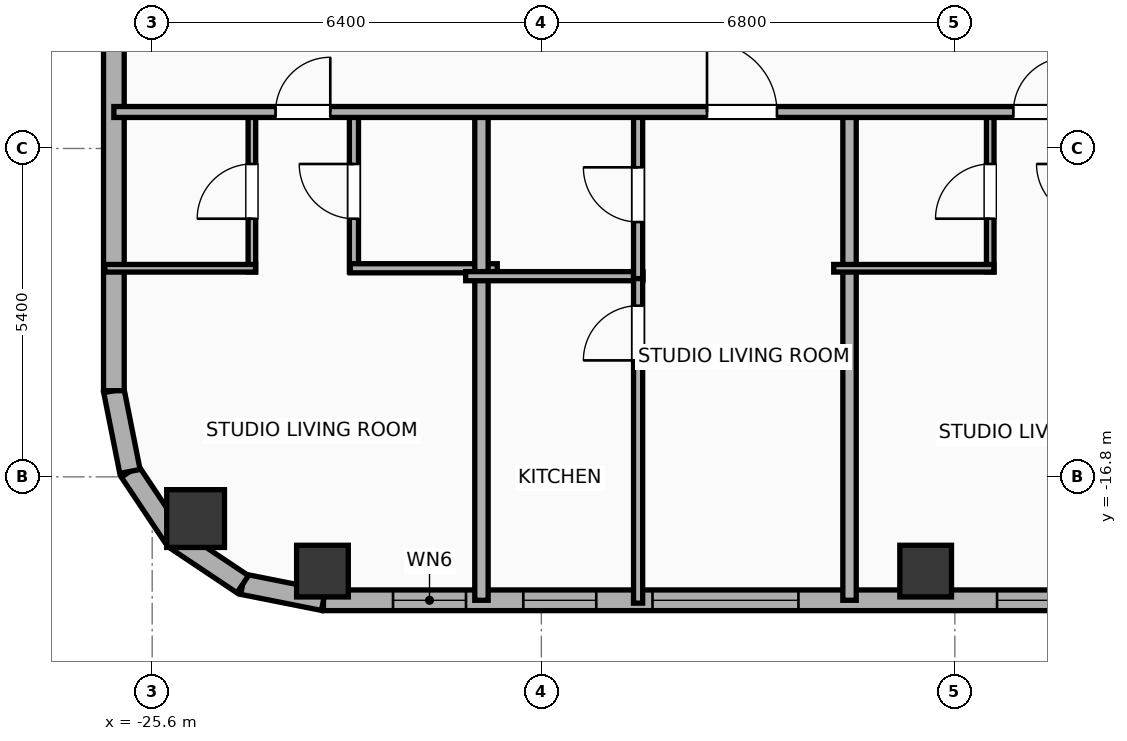
"""IFC4 building model, lengths in metres.
Left out: names, types, materials, properties, quantities, classifications, styles, units other than length and angle.
Written with IfcOpenShell. Run it as: python <this file> out.ifc"""

import sys

from ifc_helpers import new_model, si_unit, direction, frame, frame_2d, origin, origin_2d, place, context, subcontext, project, spatial, rectangle, hollow_rectangle, hollow_circle, extrude, element, fill, save


model = new_model("IFC4")
c1 = context("Model", 3, precision=1e-05, world=origin(), true_north=direction((0.0, 1.0)))
c2 = subcontext(c1, "Body", "Model", "MODEL_VIEW")
j1 = project(units=[si_unit("LENGTHUNIT", "METRE"), si_unit("PLANEANGLEUNIT", "RADIAN")], contexts=[c1])
p1 = place(None, origin())
s1 = spatial("IfcSite", under=j1, at=p1, CompositionType="ELEMENT")
p2 = place(p1, origin())
s2 = spatial("IfcBuilding", under=s1, at=p2, CompositionType="ELEMENT")
p3 = place(p2, frame((0.0, 0.0, 223.6)))
s3 = spatial("IfcBuildingStorey", under=s2, at=p3, CompositionType="ELEMENT", Elevation=223.6)
for number, where, z_axis, x_axis in (
    (1, (-22.8, -18.35, 0.0), (0.0, 0.0, 1.0), (1.0, 0.0, 0.0)),
    (2, (-12.88, -18.35, 0.0), (0.0, 0.0, 1.0), (1.0, 0.0, 0.0)),
):
    element("IfcColumn", number, at=place(p3, frame(where, z_axis=z_axis, x_axis=x_axis)), inside=s3, PredefinedType="COLUMN", context=c2, shape_type="SweptSolid", body=[
        extrude(hollow_rectangle(XDim=0.85, YDim=0.85, WallThickness=0.028, at=origin_2d()), origin(), (0.0, 0.0, 1.0), 3.9),
    ])
p4 = place(p3, frame((-24.886, -17.486, 0.0), z_axis=(0.0, 0.0, 1.0), x_axis=(1.0, 0.0, 0.0)))
e3 = element("IfcColumn", 3, at=p4, inside=s3, PredefinedType="COLUMN", context=c2, shape_type="SweptSolid", body=[
    extrude(hollow_circle(Radius=0.475, WallThickness=0.032, at=origin_2d()), origin(), (0.0, 0.0, 1.0), 3.9),
])
p5 = place(p3, frame((26.783, -18.83, 0.0), z_axis=(0.0, 0.0, 1.0), x_axis=(-1.0, 0.0, 0.0)))
e4 = element("IfcWall", 4, at=p5, inside=s3, PredefinedType="ELEMENTEDWALL", context=c2, shape_type="SweptSolid", body=[
    extrude(rectangle(XDim=49.566, YDim=0.34, at=frame_2d((24.783, 0.0))), origin(), (0.0, 0.0, 1.0), 3.65),
])
p6 = place(p5, frame((23.583, 0.0, 0.75)))
e5 = element("IfcOpeningElement", 5, at=p6, cuts=e4, PredefinedType="OPENING", context=c2, shape_type="SweptSolid", body=[
    extrude(rectangle(XDim=2.4, YDim=2.1, at=frame_2d((1.2, 1.05))), frame((0.0, 0.18, 0.0), z_axis=(0.0, -1.0, 0.0), x_axis=(1.0, 0.0, 0.0)), (0.0, 0.0, 1.0), 0.36),
])
p7 = place(p5, frame((41.756, 0.0, 0.75)))
e6 = element("IfcOpeningElement", 6, at=p7, cuts=e4, PredefinedType="OPENING", context=c2, shape_type="SweptSolid", body=[
    extrude(rectangle(XDim=2.4, YDim=2.1, at=frame_2d((1.2, 1.05))), frame((0.0, 0.18, 0.0), z_axis=(0.0, -1.0, 0.0), x_axis=(1.0, 0.0, 0.0)), (0.0, 0.0, 1.0), 0.36),
])
p8 = place(p5, frame((47.222, 0.0, 0.75)))
e7 = element("IfcOpeningElement", 7, at=p8, cuts=e4, PredefinedType="OPENING", context=c2, shape_type="SweptSolid", body=[
    extrude(rectangle(XDim=1.2, YDim=2.05, at=frame_2d((0.6, 1.025))), frame((0.0, 0.18, 0.0), z_axis=(0.0, -1.0, 0.0), x_axis=(1.0, 0.0, 0.0)), (0.0, 0.0, 1.0), 0.36),
])
p9 = place(p5, frame((45.08, 0.0, 0.75)))
e8 = element("IfcOpeningElement", 8, at=p9, cuts=e4, PredefinedType="OPENING", context=c2, shape_type="SweptSolid", body=[
    extrude(rectangle(XDim=1.2, YDim=2.05, at=frame_2d((0.6, 1.025))), frame((0.0, 0.18, 0.0), z_axis=(0.0, -1.0, 0.0), x_axis=(1.0, 0.0, 0.0)), (0.0, 0.0, 1.0), 0.36),
])
p10 = place(p5, frame((37.289, 0.0, 0.75)))
e9 = element("IfcOpeningElement", 9, at=p10, cuts=e4, PredefinedType="OPENING", context=c2, shape_type="SweptSolid", body=[
    extrude(rectangle(XDim=1.2, YDim=2.05, at=frame_2d((0.6, 1.025))), frame((0.0, 0.18, 0.0), z_axis=(0.0, -1.0, 0.0), x_axis=(1.0, 0.0, 0.0)), (0.0, 0.0, 1.0), 0.36),
])
p11 = place(p5, frame((16.115, 0.0, 0.75)))
e10 = element("IfcOpeningElement", 10, at=p11, cuts=e4, PredefinedType="OPENING", context=c2, shape_type="SweptSolid", body=[
    extrude(rectangle(XDim=1.2, YDim=2.05, at=frame_2d((0.6, 1.025))), frame((0.0, 0.18, 0.0), z_axis=(0.0, -1.0, 0.0), x_axis=(1.0, 0.0, 0.0)), (0.0, 0.0, 1.0), 0.36),
])
p12 = place(p5, frame((12.422, 0.0, 0.75)))
e11 = element("IfcOpeningElement", 11, at=p12, cuts=e4, PredefinedType="OPENING", context=c2, shape_type="SweptSolid", body=[
    extrude(rectangle(XDim=1.2, YDim=2.05, at=frame_2d((0.6, 1.025))), frame((0.0, 0.18, 0.0), z_axis=(0.0, -1.0, 0.0), x_axis=(1.0, 0.0, 0.0)), (0.0, 0.0, 1.0), 0.36),
])
p13 = place(p5, frame((8.09, 0.0, 0.75)))
e12 = element("IfcOpeningElement", 12, at=p13, cuts=e4, PredefinedType="OPENING", context=c2, shape_type="SweptSolid", body=[
    extrude(rectangle(XDim=1.2, YDim=2.05, at=frame_2d((0.6, 1.025))), frame((0.0, 0.18, 0.0), z_axis=(0.0, -1.0, 0.0), x_axis=(1.0, 0.0, 0.0)), (0.0, 0.0, 1.0), 0.36),
])
p14 = place(p5, frame((4.637, 0.0, 0.75)))
e13 = element("IfcOpeningElement", 13, at=p14, cuts=e4, PredefinedType="OPENING", context=c2, shape_type="SweptSolid", body=[
    extrude(rectangle(XDim=1.2, YDim=2.05, at=frame_2d((0.6, 1.025))), frame((0.0, 0.18, 0.0), z_axis=(0.0, -1.0, 0.0), x_axis=(1.0, 0.0, 0.0)), (0.0, 0.0, 1.0), 0.36),
])
p15 = place(p5, frame((1.811, 0.0, 0.75)))
e14 = element("IfcOpeningElement", 14, at=p15, cuts=e4, PredefinedType="OPENING", context=c2, shape_type="SweptSolid", body=[
    extrude(rectangle(XDim=1.2, YDim=2.05, at=frame_2d((0.6, 1.025))), frame((0.0, 0.18, 0.0), z_axis=(0.0, -1.0, 0.0), x_axis=(1.0, 0.0, 0.0)), (0.0, 0.0, 1.0), 0.36),
])
p16 = place(p5, frame((32.253, 0.0, 0.75)))
e15 = element("IfcOpeningElement", 15, at=p16, cuts=e4, PredefinedType="OPENING", context=c2, shape_type="SweptSolid", body=[
    extrude(rectangle(XDim=1.2, YDim=2.05, at=frame_2d((0.6, 1.025))), frame((0.0, 0.18, 0.0), z_axis=(0.0, -1.0, 0.0), x_axis=(1.0, 0.0, 0.0)), (0.0, 0.0, 1.0), 0.36),
])
p17 = place(p5, frame((27.853, 0.0, 0.75)))
e16 = element("IfcOpeningElement", 16, at=p17, cuts=e4, PredefinedType="OPENING", context=c2, shape_type="SweptSolid", body=[
    extrude(rectangle(XDim=1.2, YDim=2.05, at=frame_2d((0.6, 1.025))), frame((0.0, 0.18, 0.0), z_axis=(0.0, -1.0, 0.0), x_axis=(1.0, 0.0, 0.0)), (0.0, 0.0, 1.0), 0.36),
])
p18 = place(p5, frame((20.473, 0.0, 0.75)))
e17 = element("IfcOpeningElement", 17, at=p18, cuts=e4, PredefinedType="OPENING", context=c2, shape_type="SweptSolid", body=[
    extrude(rectangle(XDim=1.2, YDim=2.05, at=frame_2d((0.6, 1.025))), frame((0.0, 0.18, 0.0), z_axis=(0.0, -1.0, 0.0), x_axis=(1.0, 0.0, 0.0)), (0.0, 0.0, 1.0), 0.36),
])
p19 = place(p3, frame((-22.783, -18.83, 0.0), z_axis=(0.0, 0.0, 1.0), x_axis=(-0.980788153188, 0.195075878998, 0.0)))
e18 = element("IfcWall", 18, at=p19, inside=s3, PredefinedType="ELEMENTEDWALL", context=c2, shape_type="SweptSolid", body=[
    extrude(rectangle(XDim=1.354, YDim=0.34, at=frame_2d((0.677, 0.0))), origin(), (0.0, 0.0, 1.0), 3.65),
])
p20 = place(p3, frame((-24.111, -18.566, 0.0), z_axis=(0.0, 0.0, 1.0), x_axis=(-0.831403586725, 0.555669034571, 0.0)))
e19 = element("IfcWall", 19, at=p20, inside=s3, PredefinedType="ELEMENTEDWALL", context=c2, shape_type="SweptSolid", body=[
    extrude(rectangle(XDim=1.337, YDim=0.34, at=frame_2d((0.668, 0.0))), origin(), (0.0, 0.0, 1.0), 3.65),
])
p21 = place(p3, frame((-25.223, -17.823, 0.0), z_axis=(0.0, 0.0, 1.0), x_axis=(-0.555584683399, 0.831459956686, 0.0)))
e20 = element("IfcWall", 20, at=p21, inside=s3, PredefinedType="ELEMENTEDWALL", context=c2, shape_type="SweptSolid", body=[
    extrude(rectangle(XDim=1.337, YDim=0.34, at=frame_2d((0.668, 0.0))), origin(), (0.0, 0.0, 1.0), 3.65),
])
p22 = place(p3, frame((-25.966, -16.711, 0.0), z_axis=(0.0, 0.0, 1.0), x_axis=(-0.195110379894, 0.98078129043, 0.0)))
e21 = element("IfcWall", 21, at=p22, inside=s3, PredefinedType="ELEMENTEDWALL", context=c2, shape_type="SweptSolid", body=[
    extrude(rectangle(XDim=1.354, YDim=0.34, at=frame_2d((0.677, 0.0))), origin(), (0.0, 0.0, 1.0), 3.65),
])
p23 = place(p3, frame((-26.23, -15.383, 0.0), z_axis=(0.0, 0.0, 1.0), x_axis=(0.0, 1.0, 0.0)))
e22 = element("IfcWall", 22, at=p23, inside=s3, PredefinedType="ELEMENTEDWALL", context=c2, shape_type="SweptSolid", body=[
    extrude(rectangle(XDim=31.967, YDim=0.34, at=frame_2d((15.983, 0.0))), origin(), (0.0, 0.0, 1.0), 3.65),
])
p24 = place(p23, frame((29.55, 0.0, 0.75)))
e23 = element("IfcOpeningElement", 23, at=p24, cuts=e22, PredefinedType="OPENING", context=c2, shape_type="SweptSolid", body=[
    extrude(rectangle(XDim=1.2, YDim=2.05, at=frame_2d((0.6, 1.025))), frame((0.0, 0.18, 0.0), z_axis=(0.0, -1.0, 0.0), x_axis=(1.0, 0.0, 0.0)), (0.0, 0.0, 1.0), 0.36),
])
p25 = place(p23, frame((20.778, 0.0, 0.75)))
e24 = element("IfcOpeningElement", 24, at=p25, cuts=e22, PredefinedType="OPENING", context=c2, shape_type="SweptSolid", body=[
    extrude(rectangle(XDim=1.2, YDim=2.05, at=frame_2d((0.6, 1.025))), frame((0.0, 0.18, 0.0), z_axis=(0.0, -1.0, 0.0), x_axis=(1.0, 0.0, 0.0)), (0.0, 0.0, 1.0), 0.36),
])
p26 = place(p23, frame((7.323, 0.0, 0.75)))
e25 = element("IfcOpeningElement", 25, at=p26, cuts=e22, PredefinedType="OPENING", context=c2, shape_type="SweptSolid", body=[
    extrude(rectangle(XDim=1.2, YDim=2.05, at=frame_2d((0.6, 1.025))), frame((0.0, 0.18, 0.0), z_axis=(0.0, -1.0, 0.0), x_axis=(1.0, 0.0, 0.0)), (0.0, 0.0, 1.0), 0.36),
])
p27 = place(p3, frame((-23.96, -13.43, 0.0), z_axis=(0.0, 0.0, 1.0), x_axis=(0.0, 1.0, 0.0)))
e26 = element("IfcWall", 26, at=p27, inside=s3, PredefinedType="PARTITIONING", context=c2, shape_type="SweptSolid", body=[
    extrude(rectangle(XDim=2.65, YDim=0.125, at=frame_2d((1.325, 0.0))), origin(), (0.0, 0.0, 1.0), 3.65),
])
p28 = place(p27, frame((0.875, 0.0, 0.0)))
e27 = element("IfcOpeningElement", 27, at=p28, cuts=e26, PredefinedType="OPENING", context=c2, shape_type="SweptSolid", body=[
    extrude(rectangle(XDim=0.9, YDim=2.05, at=frame_2d((0.45, 1.025))), frame((0.0, 0.073, 0.0), z_axis=(0.0, -1.0, 0.0), x_axis=(1.0, 0.0, 0.0)), (0.0, 0.0, 1.0), 0.145),
])
p29 = place(p3, frame((-22.282, -13.43, 0.0), z_axis=(0.0, 0.0, 1.0), x_axis=(0.0, 1.0, 0.0)))
e28 = element("IfcWall", 28, at=p29, inside=s3, PredefinedType="PLUMBINGWALL", context=c2, shape_type="SweptSolid", body=[
    extrude(rectangle(XDim=2.65, YDim=0.15, at=frame_2d((1.325, 0.0))), origin(), (0.0, 0.0, 1.0), 3.65),
])
p30 = place(p29, frame((0.875, 0.0, 0.0)))
e29 = element("IfcOpeningElement", 29, at=p30, cuts=e28, PredefinedType="OPENING", context=c2, shape_type="SweptSolid", body=[
    extrude(rectangle(XDim=0.9, YDim=2.05, at=frame_2d((0.45, 1.025))), frame((0.0, 0.085, 0.0), z_axis=(0.0, -1.0, 0.0), x_axis=(1.0, 0.0, 0.0)), (0.0, 0.0, 1.0), 0.17),
])
p31 = place(p3, frame((-26.38, -13.37, 0.0), z_axis=(0.0, 0.0, 1.0), x_axis=(1.0, 0.0, 0.0)))
e30 = element("IfcWall", 30, at=p31, inside=s3, PredefinedType="PARTITIONING", context=c2, shape_type="SweptSolid", body=[
    extrude(rectangle(XDim=2.48, YDim=0.125, at=frame_2d((1.24, 0.0))), origin(), (0.0, 0.0, 1.0), 3.65),
])
p32 = place(p3, frame((-22.342, -13.37, 0.0), z_axis=(0.0, 0.0, 1.0), x_axis=(1.0, 0.0, 0.0)))
e31 = element("IfcWall", 31, at=p32, inside=s3, PredefinedType="PLUMBINGWALL", context=c2, shape_type="SweptSolid", body=[
    extrude(rectangle(XDim=2.417, YDim=0.15, at=frame_2d((1.208, 0.0))), origin(), (0.0, 0.0, 1.0), 3.65),
])
p33 = place(p3, frame((-20.185, -18.83, 0.0), z_axis=(0.0, 0.0, 1.0), x_axis=(0.0, 1.0, 0.0)))
e32 = element("IfcWall", 32, at=p33, inside=s3, PredefinedType="PARTITIONING", context=c2, shape_type="SweptSolid", body=[
    extrude(rectangle(XDim=8.11, YDim=0.22, at=frame_2d((4.055, 0.0))), origin(), (0.0, 0.0, 1.0), 3.09),
])
p34 = place(p3, frame((-20.445, -13.5, 0.0), z_axis=(0.0, 0.0, 1.0), x_axis=(1.0, 0.0, 0.0)))
e33 = element("IfcWall", 33, at=p34, inside=s3, PredefinedType="PLUMBINGWALL", context=c2, shape_type="SweptSolid", body=[
    extrude(rectangle(XDim=2.916, YDim=0.15, at=frame_2d((1.458, 0.0))), origin(), (0.0, 0.0, 1.0), 3.65),
])
p35 = place(p3, frame((-17.609, -18.877, 0.0), z_axis=(0.0, 0.0, 1.0), x_axis=(0.0, 1.0, 0.0)))
e34 = element("IfcWall", 34, at=p35, inside=s3, PredefinedType="PLUMBINGWALL", context=c2, shape_type="SweptSolid", body=[
    extrude(rectangle(XDim=5.417, YDim=0.15, at=frame_2d((2.708, 0.0))), origin(), (0.0, 0.0, 1.0), 3.65),
])
p36 = place(p35, frame((3.992, 0.0, 0.0)))
e35 = element("IfcOpeningElement", 35, at=p36, cuts=e34, PredefinedType="OPENING", context=c2, shape_type="SweptSolid", body=[
    extrude(rectangle(XDim=0.9, YDim=2.05, at=frame_2d((0.45, 1.025))), frame((0.0, 0.085, 0.0), z_axis=(0.0, -1.0, 0.0), x_axis=(1.0, 0.0, 0.0)), (0.0, 0.0, 1.0), 0.17),
])
p37 = place(p3, frame((-17.609, -13.54, 0.0), z_axis=(0.0, 0.0, 1.0), x_axis=(0.0, 1.0, 0.0)))
e36 = element("IfcWall", 36, at=p37, inside=s3, PredefinedType="PLUMBINGWALL", context=c2, shape_type="SweptSolid", body=[
    extrude(rectangle(XDim=2.76, YDim=0.15, at=frame_2d((1.38, 0.0))), origin(), (0.0, 0.0, 1.0), 3.65),
])
p38 = place(p37, frame((0.93, 0.0, 0.0)))
e37 = element("IfcOpeningElement", 37, at=p38, cuts=e36, PredefinedType="OPENING", context=c2, shape_type="SweptSolid", body=[
    extrude(rectangle(XDim=0.9, YDim=2.05, at=frame_2d((0.45, 1.025))), frame((0.0, 0.085, 0.0), z_axis=(0.0, -1.0, 0.0), x_axis=(1.0, 0.0, 0.0)), (0.0, 0.0, 1.0), 0.17),
])
p39 = place(p3, frame((-14.132, -18.83, 0.0), z_axis=(0.0, 0.0, 1.0), x_axis=(0.0, 1.0, 0.0)))
e38 = element("IfcWall", 38, at=p39, inside=s3, PredefinedType="PARTITIONING", context=c2, shape_type="SweptSolid", body=[
    extrude(rectangle(XDim=8.11, YDim=0.22, at=frame_2d((4.055, 0.0))), origin(), (0.0, 0.0, 1.0), 3.65),
])
p40 = place(p3, frame((-11.818, -13.43, 0.0), z_axis=(0.0, 0.0, 1.0), x_axis=(0.0, 1.0, 0.0)))
e39 = element("IfcWall", 39, at=p40, inside=s3, PredefinedType="PARTITIONING", context=c2, shape_type="SweptSolid", body=[
    extrude(rectangle(XDim=2.65, YDim=0.125, at=frame_2d((1.325, 0.0))), origin(), (0.0, 0.0, 1.0), 3.65),
])
p41 = place(p40, frame((0.875, 0.0, 0.0)))
e40 = element("IfcOpeningElement", 40, at=p41, cuts=e39, PredefinedType="OPENING", context=c2, shape_type="SweptSolid", body=[
    extrude(rectangle(XDim=0.9, YDim=2.05, at=frame_2d((0.45, 1.025))), frame((0.0, 0.073, 0.0), z_axis=(0.0, -1.0, 0.0), x_axis=(1.0, 0.0, 0.0)), (0.0, 0.0, 1.0), 0.145),
])
p42 = place(p3, frame((-14.392, -13.37, 0.0), z_axis=(0.0, 0.0, 1.0), x_axis=(1.0, 0.0, 0.0)))
e41 = element("IfcWall", 41, at=p42, inside=s3, PredefinedType="PARTITIONING", context=c2, shape_type="SweptSolid", body=[
    extrude(rectangle(XDim=2.634, YDim=0.125, at=frame_2d((1.317, 0.0))), origin(), (0.0, 0.0, 1.0), 3.65),
])
p43 = place(p3, frame((-26.23, -10.8, 0.0), z_axis=(0.0, 0.0, 1.0), x_axis=(1.0, 0.0, 0.0)))
e42 = element("IfcWall", 42, at=p43, inside=s3, PredefinedType="PARTITIONING", context=c2, shape_type="SweptSolid", body=[
    extrude(rectangle(XDim=18.15, YDim=0.18, at=frame_2d((9.075, 0.0))), origin(), (0.0, 0.0, 1.0), 3.65),
])
p44 = place(p43, frame((2.659, 0.0, 0.0)))
e43 = element("IfcOpeningElement", 43, at=p44, cuts=e42, PredefinedType="OPENING", context=c2, shape_type="SweptSolid", body=[
    extrude(rectangle(XDim=0.9, YDim=2.05, at=frame_2d((0.45, 1.025))), frame((0.0, 0.1, 0.0), z_axis=(0.0, -1.0, 0.0), x_axis=(1.0, 0.0, 0.0)), (0.0, 0.0, 1.0), 0.2),
])
p45 = place(p43, frame((9.754, 0.0, 0.0)))
e44 = element("IfcOpeningElement", 44, at=p45, cuts=e42, PredefinedType="OPENING", context=c2, shape_type="SweptSolid", body=[
    extrude(rectangle(XDim=1.15, YDim=2.05, at=frame_2d((0.575, 1.025))), frame((0.0, 0.1, 0.0), z_axis=(0.0, -1.0, 0.0), x_axis=(1.0, 0.0, 0.0)), (0.0, 0.0, 1.0), 0.2),
])
p46 = place(p43, frame((14.792, 0.0, 0.0)))
e45 = element("IfcOpeningElement", 45, at=p46, cuts=e42, PredefinedType="OPENING", context=c2, shape_type="SweptSolid", body=[
    extrude(rectangle(XDim=0.9, YDim=2.05, at=frame_2d((0.45, 1.025))), frame((0.0, 0.1, 0.0), z_axis=(0.0, -1.0, 0.0), x_axis=(1.0, 0.0, 0.0)), (0.0, 0.0, 1.0), 0.2),
])
p47 = place(p7, origin())
e46 = element("IfcWindow", 46, at=p47, inside=s3, PartitioningType="SINGLE_PANEL", PredefinedType="WINDOW", context=c2, shape_type="SweptSolid", body=[
    extrude(rectangle(XDim=2.4, YDim=2.1, at=frame_2d((1.2, 1.05))), frame((0.0, 0.03, 0.0), z_axis=(0.0, -1.0, 0.0), x_axis=(1.0, 0.0, 0.0)), (0.0, 0.0, 1.0), 0.06),
])
fill(e6, e46)
p48 = place(p8, origin())
e47 = element("IfcWindow", 47, at=p48, inside=s3, PartitioningType="SINGLE_PANEL", PredefinedType="WINDOW", context=c2, shape_type="SweptSolid", body=[
    extrude(rectangle(XDim=1.2, YDim=2.05, at=frame_2d((0.6, 1.025))), frame((0.0, 0.03, 0.0), z_axis=(0.0, -1.0, 0.0), x_axis=(1.0, 0.0, 0.0)), (0.0, 0.0, 1.0), 0.06),
])
fill(e7, e47)
p49 = place(p9, origin())
e48 = element("IfcWindow", 48, at=p49, inside=s3, PartitioningType="SINGLE_PANEL", PredefinedType="WINDOW", context=c2, shape_type="SweptSolid", body=[
    extrude(rectangle(XDim=1.2, YDim=2.05, at=frame_2d((0.6, 1.025))), frame((0.0, 0.03, 0.0), z_axis=(0.0, -1.0, 0.0), x_axis=(1.0, 0.0, 0.0)), (0.0, 0.0, 1.0), 0.06),
])
fill(e8, e48)
p50 = place(p10, origin())
e49 = element("IfcWindow", 49, at=p50, inside=s3, PartitioningType="SINGLE_PANEL", PredefinedType="WINDOW", context=c2, shape_type="SweptSolid", body=[
    extrude(rectangle(XDim=1.2, YDim=2.05, at=frame_2d((0.6, 1.025))), frame((0.0, 0.03, 0.0), z_axis=(0.0, -1.0, 0.0), x_axis=(1.0, 0.0, 0.0)), (0.0, 0.0, 1.0), 0.06),
])
fill(e9, e49)
p51 = place(p28, origin())
e50 = element("IfcDoor", 50, at=p51, inside=s3, OperationType="SINGLE_SWING_LEFT", PredefinedType="DOOR", context=c2, shape_type="SweptSolid", body=[
    extrude(rectangle(XDim=0.9, YDim=2.05, at=frame_2d((0.45, 1.025))), frame((0.0, 0.025, 0.0), z_axis=(0.0, -1.0, 0.0), x_axis=(1.0, 0.0, 0.0)), (0.0, 0.0, 1.0), 0.05),
])
fill(e27, e50)
p52 = place(p30, origin())
e51 = element("IfcDoor", 51, at=p52, inside=s3, OperationType="SINGLE_SWING_RIGHT", PredefinedType="DOOR", context=c2, shape_type="SweptSolid", body=[
    extrude(rectangle(XDim=0.9, YDim=2.05, at=frame_2d((0.45, 1.025))), frame((0.0, 0.025, 0.0), z_axis=(0.0, -1.0, 0.0), x_axis=(1.0, 0.0, 0.0)), (0.0, 0.0, 1.0), 0.05),
])
fill(e29, e51)
p53 = place(p36, origin())
e52 = element("IfcDoor", 52, at=p53, inside=s3, OperationType="SINGLE_SWING_LEFT", PredefinedType="DOOR", context=c2, shape_type="SweptSolid", body=[
    extrude(rectangle(XDim=0.9, YDim=2.05, at=frame_2d((0.45, 1.025))), frame((0.0, 0.025, 0.0), z_axis=(0.0, -1.0, 0.0), x_axis=(1.0, 0.0, 0.0)), (0.0, 0.0, 1.0), 0.05),
])
fill(e35, e52)
p54 = place(p38, origin())
e53 = element("IfcDoor", 53, at=p54, inside=s3, OperationType="SINGLE_SWING_RIGHT", PredefinedType="DOOR", context=c2, shape_type="SweptSolid", body=[
    extrude(rectangle(XDim=0.9, YDim=2.05, at=frame_2d((0.45, 1.025))), frame((0.0, 0.025, 0.0), z_axis=(0.0, -1.0, 0.0), x_axis=(1.0, 0.0, 0.0)), (0.0, 0.0, 1.0), 0.05),
])
fill(e37, e53)
p55 = place(p41, origin())
e54 = element("IfcDoor", 54, at=p55, inside=s3, OperationType="SINGLE_SWING_LEFT", PredefinedType="DOOR", context=c2, shape_type="SweptSolid", body=[
    extrude(rectangle(XDim=0.9, YDim=2.05, at=frame_2d((0.45, 1.025))), frame((0.0, 0.025, 0.0), z_axis=(0.0, -1.0, 0.0), x_axis=(1.0, 0.0, 0.0)), (0.0, 0.0, 1.0), 0.05),
])
fill(e40, e54)
p56 = place(p44, origin())
e55 = element("IfcDoor", 55, at=p56, inside=s3, OperationType="SINGLE_SWING_RIGHT", PredefinedType="DOOR", context=c2, shape_type="SweptSolid", body=[
    extrude(rectangle(XDim=0.9, YDim=2.05, at=frame_2d((0.45, 1.025))), frame((0.0, 0.025, 0.0), z_axis=(0.0, -1.0, 0.0), x_axis=(1.0, 0.0, 0.0)), (0.0, 0.0, 1.0), 0.05),
])
fill(e43, e55)
p57 = place(p45, origin())
e56 = element("IfcDoor", 56, at=p57, inside=s3, OperationType="SINGLE_SWING_LEFT", PredefinedType="DOOR", context=c2, shape_type="SweptSolid", body=[
    extrude(rectangle(XDim=1.15, YDim=2.05, at=frame_2d((0.575, 1.025))), frame((0.0, 0.025, 0.0), z_axis=(0.0, -1.0, 0.0), x_axis=(1.0, 0.0, 0.0)), (0.0, 0.0, 1.0), 0.05),
])
fill(e44, e56)
p58 = place(p46, origin())
e57 = element("IfcDoor", 57, at=p58, inside=s3, OperationType="SINGLE_SWING_RIGHT", PredefinedType="DOOR", context=c2, shape_type="SweptSolid", body=[
    extrude(rectangle(XDim=0.9, YDim=2.05, at=frame_2d((0.45, 1.025))), frame((0.0, 0.025, 0.0), z_axis=(0.0, -1.0, 0.0), x_axis=(1.0, 0.0, 0.0)), (0.0, 0.0, 1.0), 0.05),
])
fill(e45, e57)
save(model, sys.argv[1])
